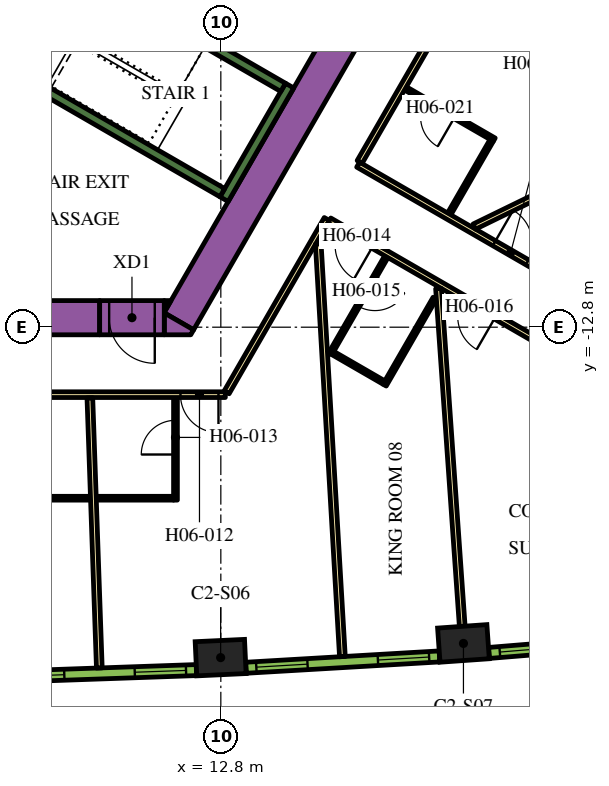
"""IFC4 building model, lengths in metres.
Left out: names, types, materials, properties, quantities, classifications, styles, units other than length and angle.
Written with IfcOpenShell. Run it as: python <this file> out.ifc"""

import sys

from ifc_helpers import new_model, si_unit, direction, frame, frame_2d, origin, origin_2d, place, context, subcontext, project, spatial, polyline, rectangle, outline, extrude, element, fill, save


model = new_model("IFC4")
c1 = context("Model", 3, precision=1e-05, world=origin(), true_north=direction((0.0, 1.0)))
c2 = subcontext(c1, "Body", "Model", "MODEL_VIEW")
j1 = project(units=[si_unit("LENGTHUNIT", "METRE"), si_unit("PLANEANGLEUNIT", "RADIAN")], contexts=[c1])
p1 = place(None, origin())
s1 = spatial("IfcSite", under=j1, at=p1, CompositionType="ELEMENT")
p2 = place(p1, origin())
s2 = spatial("IfcBuilding", under=s1, at=p2, CompositionType="ELEMENT")
p3 = place(p2, frame((0.0, 0.0, 83.7)))
s3 = spatial("IfcBuildingStorey", under=s2, at=p3, CompositionType="ELEMENT", Elevation=83.7)
for number, where, z_axis, x_axis in (
    (1, (12.795, -21.494, 0.0), (0.0, 0.0, 1.0), (0.999, 0.047, 0.0)),
    (2, (19.184, -21.12, 0.0), (0.0, 0.0, 1.0), (0.998, 0.07, 0.0)),
):
    element("IfcColumn", number, at=place(p3, frame(where, z_axis=z_axis, x_axis=x_axis)), inside=s3, PredefinedType="COLUMN", context=c2, shape_type="SweptSolid", body=[
        extrude(rectangle(XDim=1.3, YDim=0.9, at=origin_2d()), origin(), (0.0, 0.0, 1.0), 3.9),
    ])
p4 = place(p3, frame((11.695, -12.644, 0.0), z_axis=(0.0, 0.0, 1.0), x_axis=(0.500010229568, 0.86601949766, 0.0)))
e3 = element("IfcWall", 3, at=p4, inside=s3, PredefinedType="SOLIDWALL", context=c2, shape_type="SweptSolid", body=[
    extrude(rectangle(XDim=9.326, YDim=0.9, at=frame_2d((4.663, 0.0))), origin(), (0.0, 0.0, 1.0), 3.9),
])
p5 = place(p3, origin())
e4 = element("IfcWall", 4, at=p5, inside=s3, PredefinedType="SOLIDWALL", context=c2, shape_type="SweptSolid", body=[
    extrude(outline(polyline([(12.009, -13.0), (11.312, -13.0), (11.312, -12.425), (12.083, -12.871), (12.009, -13.0)])), origin(), (0.0, 0.0, 1.0), 3.9),
])
e5 = element("IfcWall", 5, at=p5, inside=s3, PredefinedType="SOLIDWALL", context=c2, shape_type="SweptSolid", body=[
    extrude(outline(polyline([(11.489, -12.1), (11.312, -12.407), (11.312, -12.1), (11.489, -12.1)])), origin(), (0.0, 0.0, 1.0), 3.9),
])
p6 = place(p3, frame((-12.019, -12.55, 0.0), z_axis=(0.0, 0.0, 1.0), x_axis=(1.0, 0.0, 0.0)))
e6 = element("IfcWall", 6, at=p6, inside=s3, PredefinedType="SOLIDWALL", context=c2, shape_type="SweptSolid", body=[
    extrude(rectangle(XDim=21.63, YDim=0.9, at=frame_2d((10.815, 0.0))), origin(), (0.0, 0.0, 1.0), 3.9),
])
p7 = place(p3, frame((12.885, -9.431, 0.0), z_axis=(0.0, 0.0, 1.0), x_axis=(0.500020560727, 0.866013532718, 0.0)))
e7 = element("IfcWall", 7, at=p7, inside=s3, PredefinedType="SOLIDWALL", context=c2, shape_type="SweptSolid", body=[
    extrude(rectangle(XDim=3.45, YDim=0.25, at=frame_2d((1.725, 0.0))), origin(), (0.0, 0.0, 1.0), 3.9),
])
p8 = place(p3, frame((12.84, -9.261, 0.0), z_axis=(0.0, 0.0, 1.0), x_axis=(-0.866013990052, 0.500019768644, 0.0)))
e8 = element("IfcWall", 8, at=p8, inside=s3, PredefinedType="SOLIDWALL", context=c2, shape_type="SweptSolid", body=[
    extrude(rectangle(XDim=6.8, YDim=0.25, at=frame_2d((3.4, 0.0))), origin(), (0.0, 0.0, 1.0), 3.9),
])
p9 = place(p3, frame((8.334, -2.964, 0.0), z_axis=(0.0, 0.0, 1.0), x_axis=(0.866016039709, -0.500016218704, 0.0)))
e9 = element("IfcWall", 9, at=p9, inside=s3, PredefinedType="SOLIDWALL", context=c2, shape_type="SweptSolid", body=[
    extrude(rectangle(XDim=7.05, YDim=0.25, at=frame_2d((3.525, 0.0))), origin(), (0.0, 0.0, 1.0), 3.9),
])
p10 = place(p3, frame((11.312, -12.55, 0.0), z_axis=(0.0, 0.0, 1.0), x_axis=(-1.0, 0.0, 0.0)))
e10 = element("IfcWall", 10, at=p10, inside=s3, PredefinedType="SOLIDWALL", context=c2, shape_type="SweptSolid", body=[
    extrude(rectangle(XDim=1.7, YDim=0.9, at=frame_2d((0.85, 0.0))), origin(), (0.0, 0.0, 1.0), 3.9),
])
p11 = place(p10, frame((0.25, 0.0, 0.0)))
e11 = element("IfcOpeningElement", 11, at=p11, cuts=e10, PredefinedType="OPENING", context=c2, shape_type="SweptSolid", body=[
    extrude(rectangle(XDim=1.2, YDim=2.1, at=frame_2d((0.6, 1.05))), frame((0.0, 0.46, 0.0), z_axis=(0.0, -1.0, 0.0), x_axis=(1.0, 0.0, 0.0)), (0.0, 0.0, 1.0), 0.92),
])
p12 = place(p3, frame((16.412, -8.523, 0.0), z_axis=(0.0, 0.0, 1.0), x_axis=(0.866025629663, -0.499999608766, 0.0)))
e12 = element("IfcWall", 12, at=p12, inside=s3, PredefinedType="PARTITIONING", context=c2, shape_type="SweptSolid", body=[
    extrude(rectangle(XDim=13.624, YDim=0.15, at=frame_2d((6.812, 0.0))), origin(), (0.0, 0.0, 1.0), 2.75),
])
p13 = place(p12, frame((4.134, 0.0, 0.0)))
e13 = element("IfcOpeningElement", 13, at=p13, cuts=e12, PredefinedType="OPENING", context=c2, shape_type="SweptSolid", body=[
    extrude(rectangle(XDim=1.0, YDim=2.1, at=frame_2d((0.5, 1.05))), frame((0.0, 0.085, 0.0), z_axis=(0.0, -1.0, 0.0), x_axis=(1.0, 0.0, 0.0)), (0.0, 0.0, 1.0), 0.17),
])
p14 = place(p3, frame((19.081, -3.9, 0.0), z_axis=(0.0, 0.0, 1.0), x_axis=(-0.499974327079, -0.866040225545, 0.0)))
e14 = element("IfcWall", 14, at=p14, inside=s3, PredefinedType="PARTITIONING", context=c2, shape_type="SweptSolid", body=[
    extrude(rectangle(XDim=5.258, YDim=0.15, at=frame_2d((2.629, 0.0))), origin(), (0.0, 0.0, 1.0), 2.75),
])
p15 = place(p14, frame((0.18, 0.0, 0.0)))
e15 = element("IfcOpeningElement", 15, at=p15, cuts=e14, PredefinedType="OPENING", context=c2, shape_type="SweptSolid", body=[
    extrude(rectangle(XDim=1.0, YDim=2.1, at=frame_2d((0.5, 1.05))), frame((0.0, 0.085, 0.0), z_axis=(0.0, -1.0, 0.0), x_axis=(1.0, 0.0, 0.0)), (0.0, 0.0, 1.0), 0.17),
])
p16 = place(p3, frame((12.918, -14.575, 0.0), z_axis=(0.0, 0.0, 1.0), x_axis=(-1.0, 0.0, 0.0)))
e16 = element("IfcWall", 16, at=p16, inside=s3, PredefinedType="PARTITIONING", context=c2, shape_type="SweptSolid", body=[
    extrude(rectangle(XDim=25.766, YDim=0.15, at=frame_2d((12.883, 0.0))), origin(), (0.0, 0.0, 1.0), 2.75),
])
p17 = place(p16, frame((19.306, 0.0, 0.0)))
e17 = element("IfcOpeningElement", 17, at=p17, cuts=e16, PredefinedType="OPENING", context=c2, shape_type="SweptSolid", body=[
    extrude(rectangle(XDim=1.0, YDim=2.1, at=frame_2d((0.5, 1.05))), frame((0.0, 0.085, 0.0), z_axis=(0.0, -1.0, 0.0), x_axis=(1.0, 0.0, 0.0)), (0.0, 0.0, 1.0), 0.17),
])
p18 = place(p16, frame((17.999, 0.0, 0.0)))
e18 = element("IfcOpeningElement", 18, at=p18, cuts=e16, PredefinedType="OPENING", context=c2, shape_type="SweptSolid", body=[
    extrude(rectangle(XDim=1.0, YDim=2.1, at=frame_2d((0.5, 1.05))), frame((0.0, 0.085, 0.0), z_axis=(0.0, -1.0, 0.0), x_axis=(1.0, 0.0, 0.0)), (0.0, 0.0, 1.0), 0.17),
])
p19 = place(p16, frame((10.874, 0.0, 0.0)))
e19 = element("IfcOpeningElement", 19, at=p19, cuts=e16, PredefinedType="OPENING", context=c2, shape_type="SweptSolid", body=[
    extrude(rectangle(XDim=0.9, YDim=2.1, at=frame_2d((0.45, 1.05))), frame((0.0, 0.085, 0.0), z_axis=(0.0, -1.0, 0.0), x_axis=(1.0, 0.0, 0.0)), (0.0, 0.0, 1.0), 0.17),
])
p20 = place(p16, frame((8.647, 0.0, 0.0)))
e20 = element("IfcOpeningElement", 20, at=p20, cuts=e16, PredefinedType="OPENING", context=c2, shape_type="SweptSolid", body=[
    extrude(rectangle(XDim=1.0, YDim=2.1, at=frame_2d((0.5, 1.05))), frame((0.0, 0.085, 0.0), z_axis=(0.0, -1.0, 0.0), x_axis=(1.0, 0.0, 0.0)), (0.0, 0.0, 1.0), 0.17),
])
p21 = place(p16, frame((0.18, 0.0, 0.0)))
e21 = element("IfcOpeningElement", 21, at=p21, cuts=e16, PredefinedType="OPENING", context=c2, shape_type="SweptSolid", body=[
    extrude(rectangle(XDim=1.0, YDim=2.1, at=frame_2d((0.5, 1.05))), frame((0.0, 0.085, 0.0), z_axis=(0.0, -1.0, 0.0), x_axis=(1.0, 0.0, 0.0)), (0.0, 0.0, 1.0), 0.17),
])
p22 = place(p3, frame((15.587, -9.952, 0.0), z_axis=(0.0, 0.0, 1.0), x_axis=(-0.500016618951, -0.866015808616, 0.0)))
e22 = element("IfcWall", 22, at=p22, inside=s3, PredefinedType="PARTITIONING", context=c2, shape_type="SweptSolid", body=[
    extrude(rectangle(XDim=5.268, YDim=0.15, at=frame_2d((2.634, 0.0))), origin(), (0.0, 0.0, 1.0), 2.75),
])
p23 = place(p3, frame((27.386, -16.764, 0.0), z_axis=(0.0, 0.0, 1.0), x_axis=(-0.866022585856, 0.500004880763, 0.0)))
e23 = element("IfcWall", 23, at=p23, inside=s3, PredefinedType="PARTITIONING", context=c2, shape_type="SweptSolid", body=[
    extrude(rectangle(XDim=13.544, YDim=0.15, at=frame_2d((6.772, 0.0))), origin(), (0.0, 0.0, 1.0), 2.75),
])
p24 = place(p23, frame((12.214, 0.0, 0.0)))
e24 = element("IfcOpeningElement", 24, at=p24, cuts=e23, PredefinedType="OPENING", context=c2, shape_type="SweptSolid", body=[
    extrude(rectangle(XDim=1.0, YDim=2.1, at=frame_2d((0.5, 1.05))), frame((0.0, 0.085, 0.0), z_axis=(0.0, -1.0, 0.0), x_axis=(1.0, 0.0, 0.0)), (0.0, 0.0, 1.0), 0.17),
])
p25 = place(p23, frame((8.49, 0.0, 0.0)))
e25 = element("IfcOpeningElement", 25, at=p25, cuts=e23, PredefinedType="OPENING", context=c2, shape_type="SweptSolid", body=[
    extrude(rectangle(XDim=1.0, YDim=2.1, at=frame_2d((0.5, 1.05))), frame((0.0, 0.085, 0.0), z_axis=(0.0, -1.0, 0.0), x_axis=(1.0, 0.0, 0.0)), (0.0, 0.0, 1.0), 0.17),
])
p26 = place(p3, frame((9.603, -21.767, 0.0), z_axis=(0.0, 0.0, 1.0), x_axis=(-0.035053506859, 0.999385436985, 0.0)))
e26 = element("IfcWall", 26, at=p26, inside=s3, PredefinedType="PARTITIONING", context=c2, shape_type="SweptSolid", body=[
    extrude(rectangle(XDim=7.111, YDim=0.15, at=frame_2d((3.556, 0.0))), origin(), (0.0, 0.0, 1.0), 2.75),
])
p27 = place(p3, frame((15.999, -21.467, 0.0), z_axis=(0.0, 0.0, 1.0), x_axis=(-0.058433825336, 0.998291284173, 0.0)))
e27 = element("IfcWall", 27, at=p27, inside=s3, PredefinedType="PARTITIONING", context=c2, shape_type="SweptSolid", body=[
    extrude(rectangle(XDim=10.875, YDim=0.15, at=frame_2d((5.438, 0.0))), origin(), (0.0, 0.0, 1.0), 2.75),
])
p28 = place(p3, frame((19.153, -20.671, 0.0), z_axis=(0.0, 0.0, 1.0), x_axis=(-0.070070736723, 0.997542025107, 0.0)))
e28 = element("IfcWall", 28, at=p28, inside=s3, PredefinedType="PARTITIONING", context=c2, shape_type="SweptSolid", body=[
    extrude(rectangle(XDim=8.909, YDim=0.15, at=frame_2d((4.455, 0.0))), origin(), (0.0, 0.0, 1.0), 2.75),
])
p29 = place(p3, frame((27.479, -6.251, 0.0), z_axis=(0.0, 0.0, 1.0), x_axis=(-0.898945877276, -0.438059710231, 0.0)))
e29 = element("IfcWall", 29, at=p29, inside=s3, PredefinedType="PARTITIONING", context=c2, shape_type="SweptSolid", body=[
    extrude(rectangle(XDim=8.909, YDim=0.15, at=frame_2d((4.455, 0.0))), origin(), (0.0, 0.0, 1.0), 2.75),
])
p30 = place(p3, frame((7.15, -17.3, 0.0), z_axis=(0.0, 0.0, 1.0), x_axis=(1.0, 0.0, 0.0)))
e30 = element("IfcWall", 30, at=p30, inside=s3, PredefinedType="PARTITIONING", context=c2, shape_type="SweptSolid", body=[
    extrude(rectangle(XDim=2.22, YDim=0.1, at=frame_2d((1.11, 0.0))), origin(), (0.0, 0.0, 1.0), 2.75),
])
p31 = place(p3, frame((11.607, -17.35, 0.0), z_axis=(0.0, 0.0, 1.0), x_axis=(0.0, 1.0, 0.0)))
e31 = element("IfcWall", 31, at=p31, inside=s3, PredefinedType="PARTITIONING", context=c2, shape_type="SweptSolid", body=[
    extrude(rectangle(XDim=2.7, YDim=0.1, at=frame_2d((1.35, 0.0))), origin(), (0.0, 0.0, 1.0), 2.75),
])
p32 = place(p31, frame((1.2, 0.0, 0.0)))
e32 = element("IfcOpeningElement", 32, at=p32, cuts=e31, PredefinedType="OPENING", context=c2, shape_type="SweptSolid", body=[
    extrude(rectangle(XDim=0.9, YDim=2.1, at=frame_2d((0.45, 1.05))), frame((0.0, 0.06, 0.0), z_axis=(0.0, -1.0, 0.0), x_axis=(1.0, 0.0, 0.0)), (0.0, 0.0, 1.0), 0.12),
])
p33 = place(p3, frame((11.557, -17.3, 0.0), z_axis=(0.0, 0.0, 1.0), x_axis=(-1.0, 0.0, 0.0)))
e33 = element("IfcWall", 33, at=p33, inside=s3, PredefinedType="PARTITIONING", context=c2, shape_type="SweptSolid", body=[
    extrude(rectangle(XDim=2.03, YDim=0.1, at=frame_2d((1.015, 0.0))), origin(), (0.0, 0.0, 1.0), 2.75),
])
p34 = place(p3, frame((17.155, -10.944, 0.0), z_axis=(0.0, 0.0, 1.0), x_axis=(-0.499939757307, -0.866060182126, 0.0)))
e34 = element("IfcWall", 34, at=p34, inside=s3, PredefinedType="PARTITIONING", context=c2, shape_type="SweptSolid", body=[
    extrude(rectangle(XDim=2.95, YDim=0.1, at=frame_2d((1.475, 0.0))), origin(), (0.0, 0.0, 1.0), 2.75),
])
p35 = place(p34, frame((0.6, 0.0, 0.0)))
e35 = element("IfcOpeningElement", 35, at=p35, cuts=e34, PredefinedType="OPENING", context=c2, shape_type="SweptSolid", body=[
    extrude(rectangle(XDim=0.9, YDim=2.1, at=frame_2d((0.45, 1.05))), frame((0.0, 0.06, 0.0), z_axis=(0.0, -1.0, 0.0), x_axis=(1.0, 0.0, 0.0)), (0.0, 0.0, 1.0), 0.12),
])
p36 = place(p3, frame((15.748, -13.48, 0.0), z_axis=(0.0, 0.0, 1.0), x_axis=(0.866083307622, -0.499899694197, 0.0)))
e36 = element("IfcWall", 36, at=p36, inside=s3, PredefinedType="PARTITIONING", context=c2, shape_type="SweptSolid", body=[
    extrude(rectangle(XDim=1.55, YDim=0.1, at=frame_2d((0.775, 0.0))), origin(), (0.0, 0.0, 1.0), 2.75),
])
p37 = place(p3, frame((18.429, -12.037, 0.0), z_axis=(0.0, 0.0, 1.0), x_axis=(-0.500007957085, -0.86602080971, 0.0)))
e37 = element("IfcWall", 37, at=p37, inside=s3, PredefinedType="PARTITIONING", context=c2, shape_type="SweptSolid", body=[
    extrude(rectangle(XDim=2.64, YDim=0.1, at=frame_2d((1.32, 0.0))), origin(), (0.0, 0.0, 1.0), 2.75),
])
p38 = place(p3, frame((19.996, -7.867, 0.0), z_axis=(0.0, 0.0, 1.0), x_axis=(-0.866019956843, 0.50000943426, 0.0)))
e38 = element("IfcWall", 38, at=p38, inside=s3, PredefinedType="PARTITIONING", context=c2, shape_type="SweptSolid", body=[
    extrude(rectangle(XDim=2.7, YDim=0.1, at=frame_2d((1.35, 0.0))), origin(), (0.0, 0.0, 1.0), 2.75),
])
p39 = place(p38, frame((1.2, 0.0, 0.0)))
e39 = element("IfcOpeningElement", 39, at=p39, cuts=e38, PredefinedType="OPENING", context=c2, shape_type="SweptSolid", body=[
    extrude(rectangle(XDim=0.9, YDim=2.1, at=frame_2d((0.45, 1.05))), frame((0.0, 0.06, 0.0), z_axis=(0.0, -1.0, 0.0), x_axis=(1.0, 0.0, 0.0)), (0.0, 0.0, 1.0), 0.12),
])
p40 = place(p3, frame((19.922, -7.894, 0.0), z_axis=(0.0, 0.0, 1.0), x_axis=(-0.499995378973, -0.866028071719, 0.0)))
e40 = element("IfcWall", 40, at=p40, inside=s3, PredefinedType="PARTITIONING", context=c2, shape_type="SweptSolid", body=[
    extrude(rectangle(XDim=2.22, YDim=0.1, at=frame_2d((1.11, 0.0))), origin(), (0.0, 0.0, 1.0), 2.75),
])
p41 = place(p3, frame((7.059, -22.001, 0.0), z_axis=(0.0, 0.0, 1.0), x_axis=(0.999385993957, 0.035037623812, 0.0)))
e41 = element("IfcWall", 41, at=p41, inside=s3, PredefinedType="SOLIDWALL", context=c2, shape_type="SweptSolid", body=[
    extrude(rectangle(XDim=5.101, YDim=0.29, at=frame_2d((2.55, 0.0))), origin(), (0.0, 0.0, 1.0), 3.65),
])
p42 = place(p41, frame((0.273, 0.0, 0.9)))
e42 = element("IfcOpeningElement", 42, at=p42, cuts=e41, PredefinedType="OPENING", context=c2, shape_type="SweptSolid", body=[
    extrude(rectangle(XDim=1.35, YDim=2.15, at=frame_2d((0.675, 1.075))), frame((0.0, 0.155, 0.0), z_axis=(0.0, -1.0, 0.0), x_axis=(1.0, 0.0, 0.0)), (0.0, 0.0, 1.0), 0.31),
])
p43 = place(p41, frame((3.478, 0.0, 0.9)))
e43 = element("IfcOpeningElement", 43, at=p43, cuts=e41, PredefinedType="OPENING", context=c2, shape_type="SweptSolid", body=[
    extrude(rectangle(XDim=1.35, YDim=2.15, at=frame_2d((0.675, 1.075))), frame((0.0, 0.155, 0.0), z_axis=(0.0, -1.0, 0.0), x_axis=(1.0, 0.0, 0.0)), (0.0, 0.0, 1.0), 0.31),
])
p44 = place(p3, frame((13.462, -21.761, 0.0), z_axis=(0.0, 0.0, 1.0), x_axis=(0.998290511436, 0.058447025388, 0.0)))
e44 = element("IfcWall", 44, at=p44, inside=s3, PredefinedType="SOLIDWALL", context=c2, shape_type="SweptSolid", body=[
    extrude(rectangle(XDim=5.1, YDim=0.29, at=frame_2d((2.55, 0.0))), origin(), (0.0, 0.0, 1.0), 3.65),
])
p45 = place(p44, frame((0.272, 0.0, 0.9)))
e45 = element("IfcOpeningElement", 45, at=p45, cuts=e44, PredefinedType="OPENING", context=c2, shape_type="SweptSolid", body=[
    extrude(rectangle(XDim=1.35, YDim=2.15, at=frame_2d((0.675, 1.075))), frame((0.0, 0.155, 0.0), z_axis=(0.0, -1.0, 0.0), x_axis=(1.0, 0.0, 0.0)), (0.0, 0.0, 1.0), 0.31),
])
p46 = place(p44, frame((3.478, 0.0, 0.9)))
e46 = element("IfcOpeningElement", 46, at=p46, cuts=e44, PredefinedType="OPENING", context=c2, shape_type="SweptSolid", body=[
    extrude(rectangle(XDim=1.35, YDim=2.15, at=frame_2d((0.675, 1.075))), frame((0.0, 0.155, 0.0), z_axis=(0.0, -1.0, 0.0), x_axis=(1.0, 0.0, 0.0)), (0.0, 0.0, 1.0), 0.31),
])
p47 = place(p3, frame((19.857, -21.371, 0.0), z_axis=(0.0, 0.0, 1.0), x_axis=(0.99665273362, 0.081751627308, 0.0)))
e47 = element("IfcWall", 47, at=p47, inside=s3, PredefinedType="SOLIDWALL", context=c2, shape_type="SweptSolid", body=[
    extrude(rectangle(XDim=5.107, YDim=0.29, at=frame_2d((2.553, 0.0))), origin(), (0.0, 0.0, 1.0), 3.65),
])
p48 = place(p47, frame((0.285, 0.0, 0.9)))
e48 = element("IfcOpeningElement", 48, at=p48, cuts=e47, PredefinedType="OPENING", context=c2, shape_type="SweptSolid", body=[
    extrude(rectangle(XDim=1.35, YDim=2.15, at=frame_2d((0.675, 1.075))), frame((0.0, 0.155, 0.0), z_axis=(0.0, -1.0, 0.0), x_axis=(1.0, 0.0, 0.0)), (0.0, 0.0, 1.0), 0.31),
])
p49 = place(p47, frame((3.516, 0.0, 0.9)))
e49 = element("IfcOpeningElement", 49, at=p49, cuts=e47, PredefinedType="OPENING", context=c2, shape_type="SweptSolid", body=[
    extrude(rectangle(XDim=1.35, YDim=2.15, at=frame_2d((0.675, 1.075))), frame((0.0, 0.155, 0.0), z_axis=(0.0, -1.0, 0.0), x_axis=(1.0, 0.0, 0.0)), (0.0, 0.0, 1.0), 0.31),
])
p50 = place(p11, origin())
e50 = element("IfcDoor", 50, at=p50, inside=s3, OperationType="SINGLE_SWING_LEFT", PredefinedType="DOOR", context=c2, shape_type="SweptSolid", body=[
    extrude(rectangle(XDim=1.2, YDim=2.1, at=frame_2d((0.6, 1.05))), frame((0.0, 0.025, 0.0), z_axis=(0.0, -1.0, 0.0), x_axis=(1.0, 0.0, 0.0)), (0.0, 0.0, 1.0), 0.05),
])
fill(e11, e50)
p51 = place(p21, origin())
e51 = element("IfcDoor", 51, at=p51, inside=s3, OperationType="SINGLE_SWING_LEFT", PredefinedType="DOOR", context=c2, shape_type="SweptSolid", body=[
    extrude(rectangle(XDim=1.0, YDim=2.1, at=frame_2d((0.5, 1.05))), frame((0.0, 0.025, 0.0), z_axis=(0.0, -1.0, 0.0), x_axis=(1.0, 0.0, 0.0)), (0.0, 0.0, 1.0), 0.05),
])
fill(e21, e51)
p52 = place(p32, origin())
e52 = element("IfcDoor", 52, at=p52, inside=s3, OperationType="SINGLE_SWING_LEFT", PredefinedType="DOOR", context=c2, shape_type="SweptSolid", body=[
    extrude(rectangle(XDim=0.9, YDim=2.1, at=frame_2d((0.45, 1.05))), frame((0.0, 0.025, 0.0), z_axis=(0.0, -1.0, 0.0), x_axis=(1.0, 0.0, 0.0)), (0.0, 0.0, 1.0), 0.05),
])
fill(e32, e52)
p53 = place(p24, origin())
e53 = element("IfcDoor", 53, at=p53, inside=s3, OperationType="SINGLE_SWING_RIGHT", PredefinedType="DOOR", context=c2, shape_type="SweptSolid", body=[
    extrude(rectangle(XDim=1.0, YDim=2.1, at=frame_2d((0.5, 1.05))), frame((0.0, 0.025, 0.0), z_axis=(0.0, -1.0, 0.0), x_axis=(1.0, 0.0, 0.0)), (0.0, 0.0, 1.0), 0.05),
])
fill(e24, e53)
p54 = place(p35, origin())
e54 = element("IfcDoor", 54, at=p54, inside=s3, OperationType="SINGLE_SWING_LEFT", PredefinedType="DOOR", context=c2, shape_type="SweptSolid", body=[
    extrude(rectangle(XDim=0.9, YDim=2.1, at=frame_2d((0.45, 1.05))), frame((0.0, 0.025, 0.0), z_axis=(0.0, -1.0, 0.0), x_axis=(1.0, 0.0, 0.0)), (0.0, 0.0, 1.0), 0.05),
])
fill(e35, e54)
p55 = place(p25, origin())
e55 = element("IfcDoor", 55, at=p55, inside=s3, OperationType="SINGLE_SWING_RIGHT", PredefinedType="DOOR", context=c2, shape_type="SweptSolid", body=[
    extrude(rectangle(XDim=1.0, YDim=2.1, at=frame_2d((0.5, 1.05))), frame((0.0, 0.025, 0.0), z_axis=(0.0, -1.0, 0.0), x_axis=(1.0, 0.0, 0.0)), (0.0, 0.0, 1.0), 0.05),
])
fill(e25, e55)
p56 = place(p13, origin())
e56 = element("IfcDoor", 56, at=p56, inside=s3, OperationType="SINGLE_SWING_LEFT", PredefinedType="DOOR", context=c2, shape_type="SweptSolid", body=[
    extrude(rectangle(XDim=1.0, YDim=2.1, at=frame_2d((0.5, 1.05))), frame((0.0, 0.025, 0.0), z_axis=(0.0, -1.0, 0.0), x_axis=(1.0, 0.0, 0.0)), (0.0, 0.0, 1.0), 0.05),
])
fill(e13, e56)
p57 = place(p39, origin())
e57 = element("IfcDoor", 57, at=p57, inside=s3, OperationType="SINGLE_SWING_LEFT", PredefinedType="DOOR", context=c2, shape_type="SweptSolid", body=[
    extrude(rectangle(XDim=0.9, YDim=2.1, at=frame_2d((0.45, 1.05))), frame((0.0, 0.025, 0.0), z_axis=(0.0, -1.0, 0.0), x_axis=(1.0, 0.0, 0.0)), (0.0, 0.0, 1.0), 0.05),
])
fill(e39, e57)
p58 = place(p42, origin())
e58 = element("IfcWindow", 58, at=p58, inside=s3, PartitioningType="DOUBLE_PANEL_VERTICAL", PredefinedType="WINDOW", context=c2, shape_type="SweptSolid", body=[
    extrude(rectangle(XDim=1.35, YDim=2.15, at=frame_2d((0.675, 1.075))), frame((0.0, 0.015, 0.0), z_axis=(0.0, -1.0, 0.0), x_axis=(1.0, 0.0, 0.0)), (0.0, 0.0, 1.0), 0.06),
])
fill(e42, e58)
p59 = place(p43, origin())
e59 = element("IfcWindow", 59, at=p59, inside=s3, PartitioningType="DOUBLE_PANEL_VERTICAL", PredefinedType="WINDOW", context=c2, shape_type="SweptSolid", body=[
    extrude(rectangle(XDim=1.35, YDim=2.15, at=frame_2d((0.675, 1.075))), frame((0.0, 0.015, 0.0), z_axis=(0.0, -1.0, 0.0), x_axis=(1.0, 0.0, 0.0)), (0.0, 0.0, 1.0), 0.06),
])
fill(e43, e59)
p60 = place(p45, origin())
e60 = element("IfcWindow", 60, at=p60, inside=s3, PartitioningType="DOUBLE_PANEL_VERTICAL", PredefinedType="WINDOW", context=c2, shape_type="SweptSolid", body=[
    extrude(rectangle(XDim=1.35, YDim=2.15, at=frame_2d((0.675, 1.075))), frame((0.0, 0.015, 0.0), z_axis=(0.0, -1.0, 0.0), x_axis=(1.0, 0.0, 0.0)), (0.0, 0.0, 1.0), 0.06),
])
fill(e45, e60)
p61 = place(p46, origin())
e61 = element("IfcWindow", 61, at=p61, inside=s3, PartitioningType="DOUBLE_PANEL_VERTICAL", PredefinedType="WINDOW", context=c2, shape_type="SweptSolid", body=[
    extrude(rectangle(XDim=1.35, YDim=2.15, at=frame_2d((0.675, 1.075))), frame((0.0, 0.015, 0.0), z_axis=(0.0, -1.0, 0.0), x_axis=(1.0, 0.0, 0.0)), (0.0, 0.0, 1.0), 0.06),
])
fill(e46, e61)
p62 = place(p48, origin())
e62 = element("IfcWindow", 62, at=p62, inside=s3, PartitioningType="DOUBLE_PANEL_VERTICAL", PredefinedType="WINDOW", context=c2, shape_type="SweptSolid", body=[
    extrude(rectangle(XDim=1.35, YDim=2.15, at=frame_2d((0.675, 1.075))), frame((0.0, 0.015, 0.0), z_axis=(0.0, -1.0, 0.0), x_axis=(1.0, 0.0, 0.0)), (0.0, 0.0, 1.0), 0.06),
])
fill(e48, e62)
save(model, sys.argv[1])
